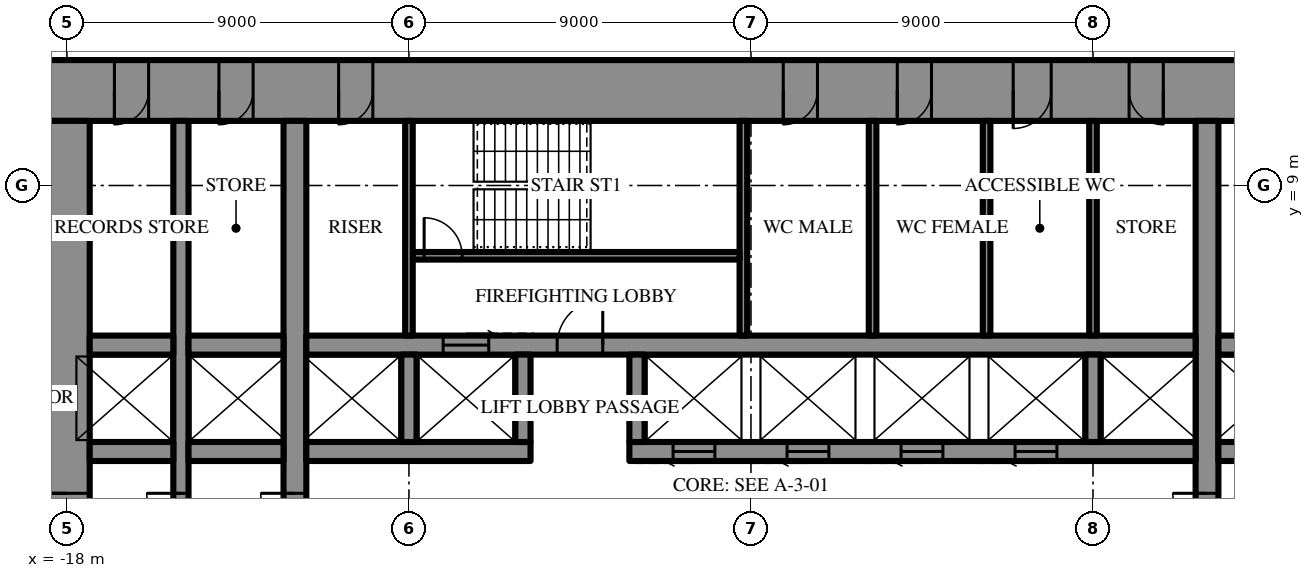
"""IFC4 building model, lengths in metres.
Left out: names, types, materials, properties, quantities, classifications, styles, units other than length and angle.
Written with IfcOpenShell. Run it as: python <this file> out.ifc"""

import sys

from ifc_helpers import new_model, si_unit, direction, frame, frame_2d, origin, place, context, subcontext, project, spatial, rectangle, extrude, element, fill, save


model = new_model("IFC4")
c1 = context("Model", 3, precision=1e-05, world=origin(), true_north=direction((0.0, 1.0)))
c2 = subcontext(c1, "Body", "Model", "MODEL_VIEW")
j1 = project(units=[si_unit("LENGTHUNIT", "METRE"), si_unit("PLANEANGLEUNIT", "RADIAN")], contexts=[c1])
p1 = place(None, origin())
s1 = spatial("IfcSite", under=j1, at=p1, CompositionType="ELEMENT")
p2 = place(p1, origin())
s2 = spatial("IfcBuilding", under=s1, at=p2, CompositionType="ELEMENT")
p3 = place(p2, frame((0.0, 0.0, 36.1)))
s3 = spatial("IfcBuildingStorey", under=s2, at=p3, CompositionType="ELEMENT", Elevation=36.1)
p4 = place(p3, frame((-18.6, 11.5, 0.0), z_axis=(0.0, 0.0, 1.0), x_axis=(1.0, 0.0, 0.0)))
e1 = element("IfcWall", 1, at=p4, inside=s3, PredefinedType="SHEAR", context=c2, shape_type="SweptSolid", body=[
    extrude(rectangle(XDim=37.2, YDim=1.6, at=frame_2d((18.6, 0.0))), origin(), (0.0, 0.0, 1.0), 4.2),
])
p5 = place(p4, frame((19.45, 0.0, 0.0)))
e2 = element("IfcOpeningElement", 2, at=p5, cuts=e1, PredefinedType="OPENING", context=c2, shape_type="SweptSolid", body=[
    extrude(rectangle(XDim=0.9, YDim=2.2, at=frame_2d((0.45, 1.1))), frame((0.0, 0.81, 0.0), z_axis=(0.0, -1.0, 0.0), x_axis=(1.0, 0.0, 0.0)), (0.0, 0.0, 1.0), 1.62),
])
p6 = place(p4, frame((22.45, 0.0, 0.0)))
e3 = element("IfcOpeningElement", 3, at=p6, cuts=e1, PredefinedType="OPENING", context=c2, shape_type="SweptSolid", body=[
    extrude(rectangle(XDim=0.9, YDim=2.2, at=frame_2d((0.45, 1.1))), frame((0.0, 0.81, 0.0), z_axis=(0.0, -1.0, 0.0), x_axis=(1.0, 0.0, 0.0)), (0.0, 0.0, 1.0), 1.62),
])
p7 = place(p4, frame((25.5, 0.0, 0.0)))
e4 = element("IfcOpeningElement", 4, at=p7, cuts=e1, PredefinedType="OPENING", context=c2, shape_type="SweptSolid", body=[
    extrude(rectangle(XDim=1.0, YDim=2.2, at=frame_2d((0.5, 1.1))), frame((0.0, 0.81, 0.0), z_axis=(0.0, -1.0, 0.0), x_axis=(1.0, 0.0, 0.0)), (0.0, 0.0, 1.0), 1.62),
])
p8 = place(p4, frame((1.85, 0.0, 0.0)))
e5 = element("IfcOpeningElement", 5, at=p8, cuts=e1, PredefinedType="OPENING", context=c2, shape_type="SweptSolid", body=[
    extrude(rectangle(XDim=0.9, YDim=2.2, at=frame_2d((0.45, 1.1))), frame((0.0, 0.81, 0.0), z_axis=(0.0, -1.0, 0.0), x_axis=(1.0, 0.0, 0.0)), (0.0, 0.0, 1.0), 1.62),
])
p9 = place(p4, frame((4.6, 0.0, 0.0)))
e6 = element("IfcOpeningElement", 6, at=p9, cuts=e1, PredefinedType="OPENING", context=c2, shape_type="SweptSolid", body=[
    extrude(rectangle(XDim=0.9, YDim=2.2, at=frame_2d((0.45, 1.1))), frame((0.0, 0.81, 0.0), z_axis=(0.0, -1.0, 0.0), x_axis=(1.0, 0.0, 0.0)), (0.0, 0.0, 1.0), 1.62),
])
p10 = place(p4, frame((7.75, 0.0, 0.0)))
e7 = element("IfcOpeningElement", 7, at=p10, cuts=e1, PredefinedType="OPENING", context=c2, shape_type="SweptSolid", body=[
    extrude(rectangle(XDim=0.9, YDim=2.2, at=frame_2d((0.45, 1.1))), frame((0.0, 0.81, 0.0), z_axis=(0.0, -1.0, 0.0), x_axis=(1.0, 0.0, 0.0)), (0.0, 0.0, 1.0), 1.62),
])
p11 = place(p4, frame((28.55, 0.0, 0.0)))
e8 = element("IfcOpeningElement", 8, at=p11, cuts=e1, PredefinedType="OPENING", context=c2, shape_type="SweptSolid", body=[
    extrude(rectangle(XDim=0.9, YDim=2.2, at=frame_2d((0.45, 1.1))), frame((0.0, 0.81, 0.0), z_axis=(0.0, -1.0, 0.0), x_axis=(1.0, 0.0, 0.0)), (0.0, 0.0, 1.0), 1.62),
])
p12 = place(p4, frame((31.7, 0.0, 0.0)))
e9 = element("IfcOpeningElement", 9, at=p12, cuts=e1, PredefinedType="OPENING", context=c2, shape_type="SweptSolid", body=[
    extrude(rectangle(XDim=0.9, YDim=2.2, at=frame_2d((0.45, 1.1))), frame((0.0, 0.81, 0.0), z_axis=(0.0, -1.0, 0.0), x_axis=(1.0, 0.0, 0.0)), (0.0, 0.0, 1.0), 1.62),
])
p13 = place(p4, frame((34.45, 0.0, 0.0)))
e10 = element("IfcOpeningElement", 10, at=p13, cuts=e1, PredefinedType="OPENING", context=c2, shape_type="SweptSolid", body=[
    extrude(rectangle(XDim=0.9, YDim=2.2, at=frame_2d((0.45, 1.1))), frame((0.0, 0.81, 0.0), z_axis=(0.0, -1.0, 0.0), x_axis=(1.0, 0.0, 0.0)), (0.0, 0.0, 1.0), 1.62),
])
p14 = place(p3, frame((-18.0, 10.7, 0.0), z_axis=(0.0, 0.0, 1.0), x_axis=(0.0, -1.0, 0.0)))
e11 = element("IfcWall", 11, at=p14, inside=s3, PredefinedType="SHEAR", context=c2, shape_type="SweptSolid", body=[
    extrude(rectangle(XDim=21.4, YDim=1.2, at=frame_2d((10.7, 0.0))), origin(), (0.0, 0.0, 1.0), 4.2),
])
p15 = place(p14, frame((9.8, 0.0, 0.0)))
e12 = element("IfcOpeningElement", 12, at=p15, cuts=e11, PredefinedType="OPENING", context=c2, shape_type="SweptSolid", body=[
    extrude(rectangle(XDim=1.8, YDim=2.4, at=frame_2d((0.9, 1.2))), frame((0.0, 0.61, 0.0), z_axis=(0.0, -1.0, 0.0), x_axis=(1.0, 0.0, 0.0)), (0.0, 0.0, 1.0), 1.22),
])
p16 = place(p3, frame((12.0, -10.7, 0.0), z_axis=(0.0, 0.0, 1.0), x_axis=(0.0, 1.0, 0.0)))
e13 = element("IfcWall", 13, at=p16, inside=s3, PredefinedType="SHEAR", context=c2, shape_type="SweptSolid", body=[
    extrude(rectangle(XDim=21.4, YDim=0.6, at=frame_2d((10.7, 0.0))), origin(), (0.0, 0.0, 1.0), 4.2),
])
p17 = place(p16, frame((9.8, 0.0, 0.0)))
e14 = element("IfcOpeningElement", 14, at=p17, cuts=e13, PredefinedType="OPENING", context=c2, shape_type="SweptSolid", body=[
    extrude(rectangle(XDim=1.8, YDim=2.4, at=frame_2d((0.9, 1.2))), frame((0.0, 0.31, 0.0), z_axis=(0.0, -1.0, 0.0), x_axis=(1.0, 0.0, 0.0)), (0.0, 0.0, 1.0), 0.62),
])
p18 = place(p3, frame((-12.0, -10.7, 0.0), z_axis=(0.0, 0.0, 1.0), x_axis=(0.0, 1.0, 0.0)))
e15 = element("IfcWall", 15, at=p18, inside=s3, PredefinedType="SHEAR", context=c2, shape_type="SweptSolid", body=[
    extrude(rectangle(XDim=21.4, YDim=0.6, at=frame_2d((10.7, 0.0))), origin(), (0.0, 0.0, 1.0), 4.2),
])
p19 = place(p18, frame((9.8, 0.0, 0.0)))
e16 = element("IfcOpeningElement", 16, at=p19, cuts=e15, PredefinedType="OPENING", context=c2, shape_type="SweptSolid", body=[
    extrude(rectangle(XDim=1.8, YDim=2.4, at=frame_2d((0.9, 1.2))), frame((0.0, 0.31, 0.0), z_axis=(0.0, -1.0, 0.0), x_axis=(1.0, 0.0, 0.0)), (0.0, 0.0, 1.0), 0.62),
])
p20 = place(p3, frame((-15.0, -10.7, 0.0), z_axis=(0.0, 0.0, 1.0), x_axis=(0.0, 1.0, 0.0)))
e17 = element("IfcWall", 17, at=p20, inside=s3, PredefinedType="SHEAR", context=c2, shape_type="SweptSolid", body=[
    extrude(rectangle(XDim=21.4, YDim=0.4, at=frame_2d((10.7, 0.0))), origin(), (0.0, 0.0, 1.0), 4.2),
])
p21 = place(p20, frame((9.8, 0.0, 0.0)))
e18 = element("IfcOpeningElement", 18, at=p21, cuts=e17, PredefinedType="OPENING", context=c2, shape_type="SweptSolid", body=[
    extrude(rectangle(XDim=1.8, YDim=2.4, at=frame_2d((0.9, 1.2))), frame((0.0, 0.21, 0.0), z_axis=(0.0, -1.0, 0.0), x_axis=(1.0, 0.0, 0.0)), (0.0, 0.0, 1.0), 0.42),
])
p22 = place(p3, frame((-17.4, 2.0, 0.0), z_axis=(0.0, 0.0, 1.0), x_axis=(1.0, 0.0, 0.0)))
e19 = element("IfcWall", 19, at=p22, inside=s3, PredefinedType="SHEAR", context=c2, shape_type="SweptSolid", body=[
    extrude(rectangle(XDim=2.2, YDim=0.5, at=frame_2d((1.1, 0.0))), origin(), (0.0, 0.0, 1.0), 4.2),
])
p23 = place(p3, frame((-14.8, 2.0, 0.0), z_axis=(0.0, 0.0, 1.0), x_axis=(1.0, 0.0, 0.0)))
e20 = element("IfcWall", 20, at=p23, inside=s3, PredefinedType="SHEAR", context=c2, shape_type="SweptSolid", body=[
    extrude(rectangle(XDim=2.5, YDim=0.5, at=frame_2d((1.25, 0.0))), origin(), (0.0, 0.0, 1.0), 4.2),
])
p24 = place(p3, frame((-11.7, 2.0, 0.0), z_axis=(0.0, 0.0, 1.0), x_axis=(1.0, 0.0, 0.0)))
e21 = element("IfcWall", 21, at=p24, inside=s3, PredefinedType="SHEAR", context=c2, shape_type="SweptSolid", body=[
    extrude(rectangle(XDim=5.9, YDim=0.5, at=frame_2d((2.95, 0.0))), origin(), (0.0, 0.0, 1.0), 4.2),
])
p25 = place(p3, frame((-3.2, 2.0, 0.0), z_axis=(0.0, 0.0, 1.0), x_axis=(1.0, 0.0, 0.0)))
e22 = element("IfcWall", 22, at=p25, inside=s3, PredefinedType="SHEAR", context=c2, shape_type="SweptSolid", body=[
    extrude(rectangle(XDim=14.9, YDim=0.5, at=frame_2d((7.45, 0.0))), origin(), (0.0, 0.0, 1.0), 4.2),
])
p26 = place(p25, frame((1.15, 0.0, 0.0)))
e23 = element("IfcOpeningElement", 23, at=p26, cuts=e22, PredefinedType="OPENING", context=c2, shape_type="SweptSolid", body=[
    extrude(rectangle(XDim=1.1, YDim=2.2, at=frame_2d((0.55, 1.1))), frame((0.0, 0.26, 0.0), z_axis=(0.0, -1.0, 0.0), x_axis=(1.0, 0.0, 0.0)), (0.0, 0.0, 1.0), 0.52),
])
p27 = place(p25, frame((4.15, 0.0, 0.0)))
e24 = element("IfcOpeningElement", 24, at=p27, cuts=e22, PredefinedType="OPENING", context=c2, shape_type="SweptSolid", body=[
    extrude(rectangle(XDim=1.1, YDim=2.2, at=frame_2d((0.55, 1.1))), frame((0.0, 0.26, 0.0), z_axis=(0.0, -1.0, 0.0), x_axis=(1.0, 0.0, 0.0)), (0.0, 0.0, 1.0), 0.52),
])
p28 = place(p25, frame((7.15, 0.0, 0.0)))
e25 = element("IfcOpeningElement", 25, at=p28, cuts=e22, PredefinedType="OPENING", context=c2, shape_type="SweptSolid", body=[
    extrude(rectangle(XDim=1.1, YDim=2.2, at=frame_2d((0.55, 1.1))), frame((0.0, 0.26, 0.0), z_axis=(0.0, -1.0, 0.0), x_axis=(1.0, 0.0, 0.0)), (0.0, 0.0, 1.0), 0.52),
])
p29 = place(p25, frame((10.15, 0.0, 0.0)))
e26 = element("IfcOpeningElement", 26, at=p29, cuts=e22, PredefinedType="OPENING", context=c2, shape_type="SweptSolid", body=[
    extrude(rectangle(XDim=1.1, YDim=2.2, at=frame_2d((0.55, 1.1))), frame((0.0, 0.26, 0.0), z_axis=(0.0, -1.0, 0.0), x_axis=(1.0, 0.0, 0.0)), (0.0, 0.0, 1.0), 0.52),
])
p30 = place(p3, frame((12.3, 2.0, 0.0), z_axis=(0.0, 0.0, 1.0), x_axis=(1.0, 0.0, 0.0)))
e27 = element("IfcWall", 27, at=p30, inside=s3, PredefinedType="SHEAR", context=c2, shape_type="SweptSolid", body=[
    extrude(rectangle(XDim=2.5, YDim=0.5, at=frame_2d((1.25, 0.0))), origin(), (0.0, 0.0, 1.0), 4.2),
])
p31 = place(p3, frame((-17.4, 4.8, 0.0), z_axis=(0.0, 0.0, 1.0), x_axis=(1.0, 0.0, 0.0)))
e28 = element("IfcWall", 28, at=p31, inside=s3, PredefinedType="SHEAR", context=c2, shape_type="SweptSolid", body=[
    extrude(rectangle(XDim=2.2, YDim=0.5, at=frame_2d((1.1, 0.0))), origin(), (0.0, 0.0, 1.0), 4.2),
])
p32 = place(p3, frame((-14.8, 4.8, 0.0), z_axis=(0.0, 0.0, 1.0), x_axis=(1.0, 0.0, 0.0)))
e29 = element("IfcWall", 29, at=p32, inside=s3, PredefinedType="SHEAR", context=c2, shape_type="SweptSolid", body=[
    extrude(rectangle(XDim=2.5, YDim=0.5, at=frame_2d((1.25, 0.0))), origin(), (0.0, 0.0, 1.0), 4.2),
])
p33 = place(p3, frame((-11.7, 4.8, 0.0), z_axis=(0.0, 0.0, 1.0), x_axis=(1.0, 0.0, 0.0)))
e30 = element("IfcWall", 30, at=p33, inside=s3, PredefinedType="SHEAR", context=c2, shape_type="SweptSolid", body=[
    extrude(rectangle(XDim=23.4, YDim=0.5, at=frame_2d((11.7, 0.0))), origin(), (0.0, 0.0, 1.0), 4.2),
])
p34 = place(p33, frame((6.6, 0.0, 0.0)))
e31 = element("IfcOpeningElement", 31, at=p34, cuts=e30, PredefinedType="OPENING", context=c2, shape_type="SweptSolid", body=[
    extrude(rectangle(XDim=1.2, YDim=2.2, at=frame_2d((0.6, 1.1))), frame((0.0, 0.26, 0.0), z_axis=(0.0, -1.0, 0.0), x_axis=(1.0, 0.0, 0.0)), (0.0, 0.0, 1.0), 0.52),
])
p35 = place(p33, frame((3.6, 0.0, 0.0)))
e32 = element("IfcOpeningElement", 32, at=p35, cuts=e30, PredefinedType="OPENING", context=c2, shape_type="SweptSolid", body=[
    extrude(rectangle(XDim=1.2, YDim=2.2, at=frame_2d((0.6, 1.1))), frame((0.0, 0.26, 0.0), z_axis=(0.0, -1.0, 0.0), x_axis=(1.0, 0.0, 0.0)), (0.0, 0.0, 1.0), 0.52),
])
p36 = place(p3, frame((12.3, 4.8, 0.0), z_axis=(0.0, 0.0, 1.0), x_axis=(1.0, 0.0, 0.0)))
e33 = element("IfcWall", 33, at=p36, inside=s3, PredefinedType="SHEAR", context=c2, shape_type="SweptSolid", body=[
    extrude(rectangle(XDim=2.5, YDim=0.5, at=frame_2d((1.25, 0.0))), origin(), (0.0, 0.0, 1.0), 4.2),
])
for number, where, z_axis, x_axis in (
    (34, (-9.0, 2.25, 0.0), (0.0, 0.0, 1.0), (0.0, 1.0, 0.0)),
    (35, (-6.0, 2.25, 0.0), (0.0, 0.0, 1.0), (0.0, 1.0, 0.0)),
    (36, (-3.0, 2.25, 0.0), (0.0, 0.0, 1.0), (0.0, 1.0, 0.0)),
    (37, (9.0, 2.25, 0.0), (0.0, 0.0, 1.0), (0.0, 1.0, 0.0)),
):
    element("IfcWall", number, at=place(p3, frame(where, z_axis=z_axis, x_axis=x_axis)), inside=s3, PredefinedType="SHEAR", context=c2, shape_type="SweptSolid", body=[
        extrude(rectangle(XDim=2.3, YDim=0.4, at=frame_2d((1.15, 0.0))), origin(), (0.0, 0.0, 1.0), 4.2),
    ])
p37 = place(p3, frame((-0.2, 5.05, 0.0), z_axis=(0.0, 0.0, 1.0), x_axis=(0.0, 1.0, 0.0)))
e38 = element("IfcWall", 38, at=p37, inside=s3, PredefinedType="SHEAR", context=c2, shape_type="SweptSolid", body=[
    extrude(rectangle(XDim=5.65, YDim=0.2, at=frame_2d((2.825, 0.0))), origin(), (0.0, 0.0, 1.0), 4.2),
])
p38 = place(p3, frame((-8.9, 7.15, 0.0), z_axis=(0.0, 0.0, 1.0), x_axis=(1.0, 0.0, 0.0)))
e39 = element("IfcWall", 39, at=p38, inside=s3, PredefinedType="SHEAR", context=c2, shape_type="SweptSolid", body=[
    extrude(rectangle(XDim=8.6, YDim=0.2, at=frame_2d((4.3, 0.0))), origin(), (0.0, 0.0, 1.0), 4.2),
])
p39 = place(p38, frame((0.3, 0.0, 0.0)))
e40 = element("IfcOpeningElement", 40, at=p39, cuts=e39, PredefinedType="OPENING", context=c2, shape_type="SweptSolid", body=[
    extrude(rectangle(XDim=1.0, YDim=2.2, at=frame_2d((0.5, 1.1))), frame((0.0, 0.11, 0.0), z_axis=(0.0, -1.0, 0.0), x_axis=(1.0, 0.0, 0.0)), (0.0, 0.0, 1.0), 0.22),
])
for number, where, z_axis, x_axis in (
    (41, (-9.0, 5.05, 0.0), (0.0, 0.0, 1.0), (0.0, 1.0, 0.0)),
    (42, (9.0, 5.05, 0.0), (0.0, 0.0, 1.0), (0.0, 1.0, 0.0)),
    (43, (3.2, 5.05, 0.0), (0.0, 0.0, 1.0), (0.0, 1.0, 0.0)),
    (44, (6.2, 5.05, 0.0), (0.0, 0.0, 1.0), (0.0, 1.0, 0.0)),
):
    element("IfcWall", number, at=place(p3, frame(where, z_axis=z_axis, x_axis=x_axis)), inside=s3, PredefinedType="PARTITIONING", context=c2, shape_type="SweptSolid", body=[
        extrude(rectangle(XDim=5.65, YDim=0.2, at=frame_2d((2.825, 0.0))), origin(), (0.0, 0.0, 1.0), 4.0),
    ])
p40 = place(p15, frame((1.8, 0.0, 0.0), z_axis=(0.0, 0.0, 1.0), x_axis=(-1.0, 0.0, 0.0)))
e45 = element("IfcDoor", 45, at=p40, inside=s3, OperationType="DOUBLE_DOOR_SINGLE_SWING", PredefinedType="DOOR", context=c2, shape_type="SweptSolid", body=[
    extrude(rectangle(XDim=1.8, YDim=2.4, at=frame_2d((0.9, 1.2))), frame((0.0, 0.025, 0.0), z_axis=(0.0, -1.0, 0.0), x_axis=(1.0, 0.0, 0.0)), (0.0, 0.0, 1.0), 0.05),
])
fill(e12, e45)
p41 = place(p34, origin())
e46 = element("IfcDoor", 46, at=p41, inside=s3, OperationType="SINGLE_SWING_LEFT", PredefinedType="DOOR", context=c2, shape_type="SweptSolid", body=[
    extrude(rectangle(XDim=1.2, YDim=2.2, at=frame_2d((0.6, 1.1))), frame((0.0, 0.025, 0.0), z_axis=(0.0, -1.0, 0.0), x_axis=(1.0, 0.0, 0.0)), (0.0, 0.0, 1.0), 0.05),
])
fill(e31, e46)
p42 = place(p39, origin())
e47 = element("IfcDoor", 47, at=p42, inside=s3, OperationType="SINGLE_SWING_RIGHT", PredefinedType="DOOR", context=c2, shape_type="SweptSolid", body=[
    extrude(rectangle(XDim=1.0, YDim=2.2, at=frame_2d((0.5, 1.1))), frame((0.0, 0.025, 0.0), z_axis=(0.0, -1.0, 0.0), x_axis=(1.0, 0.0, 0.0)), (0.0, 0.0, 1.0), 0.05),
])
fill(e40, e47)
p43 = place(p5, frame((0.9, 0.0, 0.0), z_axis=(0.0, 0.0, 1.0), x_axis=(-1.0, 0.0, 0.0)))
e48 = element("IfcDoor", 48, at=p43, inside=s3, OperationType="SINGLE_SWING_LEFT", PredefinedType="DOOR", context=c2, shape_type="SweptSolid", body=[
    extrude(rectangle(XDim=0.9, YDim=2.2, at=frame_2d((0.45, 1.1))), frame((0.0, 0.025, 0.0), z_axis=(0.0, -1.0, 0.0), x_axis=(1.0, 0.0, 0.0)), (0.0, 0.0, 1.0), 0.05),
])
fill(e2, e48)
p44 = place(p6, frame((0.9, 0.0, 0.0), z_axis=(0.0, 0.0, 1.0), x_axis=(-1.0, 0.0, 0.0)))
e49 = element("IfcDoor", 49, at=p44, inside=s3, OperationType="SINGLE_SWING_LEFT", PredefinedType="DOOR", context=c2, shape_type="SweptSolid", body=[
    extrude(rectangle(XDim=0.9, YDim=2.2, at=frame_2d((0.45, 1.1))), frame((0.0, 0.025, 0.0), z_axis=(0.0, -1.0, 0.0), x_axis=(1.0, 0.0, 0.0)), (0.0, 0.0, 1.0), 0.05),
])
fill(e3, e49)
p45 = place(p7, frame((1.0, 0.0, 0.0), z_axis=(0.0, 0.0, 1.0), x_axis=(-1.0, 0.0, 0.0)))
e50 = element("IfcDoor", 50, at=p45, inside=s3, OperationType="SINGLE_SWING_LEFT", PredefinedType="DOOR", context=c2, shape_type="SweptSolid", body=[
    extrude(rectangle(XDim=1.0, YDim=2.2, at=frame_2d((0.5, 1.1))), frame((0.0, 0.025, 0.0), z_axis=(0.0, -1.0, 0.0), x_axis=(1.0, 0.0, 0.0)), (0.0, 0.0, 1.0), 0.05),
])
fill(e4, e50)
p46 = place(p8, frame((0.9, 0.0, 0.0), z_axis=(0.0, 0.0, 1.0), x_axis=(-1.0, 0.0, 0.0)))
e51 = element("IfcDoor", 51, at=p46, inside=s3, OperationType="SINGLE_SWING_LEFT", PredefinedType="DOOR", context=c2, shape_type="SweptSolid", body=[
    extrude(rectangle(XDim=0.9, YDim=2.2, at=frame_2d((0.45, 1.1))), frame((0.0, 0.025, 0.0), z_axis=(0.0, -1.0, 0.0), x_axis=(1.0, 0.0, 0.0)), (0.0, 0.0, 1.0), 0.05),
])
fill(e5, e51)
p47 = place(p9, frame((0.9, 0.0, 0.0), z_axis=(0.0, 0.0, 1.0), x_axis=(-1.0, 0.0, 0.0)))
e52 = element("IfcDoor", 52, at=p47, inside=s3, OperationType="SINGLE_SWING_LEFT", PredefinedType="DOOR", context=c2, shape_type="SweptSolid", body=[
    extrude(rectangle(XDim=0.9, YDim=2.2, at=frame_2d((0.45, 1.1))), frame((0.0, 0.025, 0.0), z_axis=(0.0, -1.0, 0.0), x_axis=(1.0, 0.0, 0.0)), (0.0, 0.0, 1.0), 0.05),
])
fill(e6, e52)
p48 = place(p10, frame((0.9, 0.0, 0.0), z_axis=(0.0, 0.0, 1.0), x_axis=(-1.0, 0.0, 0.0)))
e53 = element("IfcDoor", 53, at=p48, inside=s3, OperationType="SINGLE_SWING_LEFT", PredefinedType="DOOR", context=c2, shape_type="SweptSolid", body=[
    extrude(rectangle(XDim=0.9, YDim=2.2, at=frame_2d((0.45, 1.1))), frame((0.0, 0.025, 0.0), z_axis=(0.0, -1.0, 0.0), x_axis=(1.0, 0.0, 0.0)), (0.0, 0.0, 1.0), 0.05),
])
fill(e7, e53)
p49 = place(p11, frame((0.9, 0.0, 0.0), z_axis=(0.0, 0.0, 1.0), x_axis=(-1.0, 0.0, 0.0)))
e54 = element("IfcDoor", 54, at=p49, inside=s3, OperationType="SINGLE_SWING_RIGHT", PredefinedType="DOOR", context=c2, shape_type="SweptSolid", body=[
    extrude(rectangle(XDim=0.9, YDim=2.2, at=frame_2d((0.45, 1.1))), frame((0.0, 0.025, 0.0), z_axis=(0.0, -1.0, 0.0), x_axis=(1.0, 0.0, 0.0)), (0.0, 0.0, 1.0), 0.05),
])
fill(e8, e54)
p50 = place(p17, origin())
e55 = element("IfcDoor", 55, at=p50, inside=s3, OperationType="DOUBLE_DOOR_SINGLE_SWING", PredefinedType="DOOR", context=c2, shape_type="SweptSolid", body=[
    extrude(rectangle(XDim=1.8, YDim=2.4, at=frame_2d((0.9, 1.2))), frame((0.0, 0.025, 0.0), z_axis=(0.0, -1.0, 0.0), x_axis=(1.0, 0.0, 0.0)), (0.0, 0.0, 1.0), 0.05),
])
fill(e14, e55)
p51 = place(p19, origin())
e56 = element("IfcDoor", 56, at=p51, inside=s3, OperationType="DOUBLE_DOOR_SINGLE_SWING", PredefinedType="DOOR", context=c2, shape_type="SweptSolid", body=[
    extrude(rectangle(XDim=1.8, YDim=2.4, at=frame_2d((0.9, 1.2))), frame((0.0, 0.025, 0.0), z_axis=(0.0, -1.0, 0.0), x_axis=(1.0, 0.0, 0.0)), (0.0, 0.0, 1.0), 0.05),
])
fill(e16, e56)
p52 = place(p21, origin())
e57 = element("IfcDoor", 57, at=p52, inside=s3, OperationType="DOUBLE_DOOR_SINGLE_SWING", PredefinedType="DOOR", context=c2, shape_type="SweptSolid", body=[
    extrude(rectangle(XDim=1.8, YDim=2.4, at=frame_2d((0.9, 1.2))), frame((0.0, 0.025, 0.0), z_axis=(0.0, -1.0, 0.0), x_axis=(1.0, 0.0, 0.0)), (0.0, 0.0, 1.0), 0.05),
])
fill(e18, e57)
p53 = place(p35, origin())
e58 = element("IfcDoor", 58, at=p53, inside=s3, OperationType="SLIDING_TO_LEFT", PredefinedType="DOOR", context=c2, shape_type="SweptSolid", body=[
    extrude(rectangle(XDim=1.2, YDim=2.2, at=frame_2d((0.6, 1.1))), frame((0.0, 0.025, 0.0), z_axis=(0.0, -1.0, 0.0), x_axis=(1.0, 0.0, 0.0)), (0.0, 0.0, 1.0), 0.05),
])
fill(e32, e58)
p54 = place(p26, frame((1.1, 0.0, 0.0), z_axis=(0.0, 0.0, 1.0), x_axis=(-1.0, 0.0, 0.0)))
e59 = element("IfcDoor", 59, at=p54, inside=s3, OperationType="SLIDING_TO_LEFT", PredefinedType="DOOR", context=c2, shape_type="SweptSolid", body=[
    extrude(rectangle(XDim=1.1, YDim=2.2, at=frame_2d((0.55, 1.1))), frame((0.0, 0.025, 0.0), z_axis=(0.0, -1.0, 0.0), x_axis=(1.0, 0.0, 0.0)), (0.0, 0.0, 1.0), 0.05),
])
fill(e23, e59)
p55 = place(p27, frame((1.1, 0.0, 0.0), z_axis=(0.0, 0.0, 1.0), x_axis=(-1.0, 0.0, 0.0)))
e60 = element("IfcDoor", 60, at=p55, inside=s3, OperationType="SLIDING_TO_LEFT", PredefinedType="DOOR", context=c2, shape_type="SweptSolid", body=[
    extrude(rectangle(XDim=1.1, YDim=2.2, at=frame_2d((0.55, 1.1))), frame((0.0, 0.025, 0.0), z_axis=(0.0, -1.0, 0.0), x_axis=(1.0, 0.0, 0.0)), (0.0, 0.0, 1.0), 0.05),
])
fill(e24, e60)
p56 = place(p28, frame((1.1, 0.0, 0.0), z_axis=(0.0, 0.0, 1.0), x_axis=(-1.0, 0.0, 0.0)))
e61 = element("IfcDoor", 61, at=p56, inside=s3, OperationType="SLIDING_TO_LEFT", PredefinedType="DOOR", context=c2, shape_type="SweptSolid", body=[
    extrude(rectangle(XDim=1.1, YDim=2.2, at=frame_2d((0.55, 1.1))), frame((0.0, 0.025, 0.0), z_axis=(0.0, -1.0, 0.0), x_axis=(1.0, 0.0, 0.0)), (0.0, 0.0, 1.0), 0.05),
])
fill(e25, e61)
p57 = place(p29, frame((1.1, 0.0, 0.0), z_axis=(0.0, 0.0, 1.0), x_axis=(-1.0, 0.0, 0.0)))
e62 = element("IfcDoor", 62, at=p57, inside=s3, OperationType="SLIDING_TO_LEFT", PredefinedType="DOOR", context=c2, shape_type="SweptSolid", body=[
    extrude(rectangle(XDim=1.1, YDim=2.2, at=frame_2d((0.55, 1.1))), frame((0.0, 0.025, 0.0), z_axis=(0.0, -1.0, 0.0), x_axis=(1.0, 0.0, 0.0)), (0.0, 0.0, 1.0), 0.05),
])
fill(e26, e62)
save(model, sys.argv[1])
